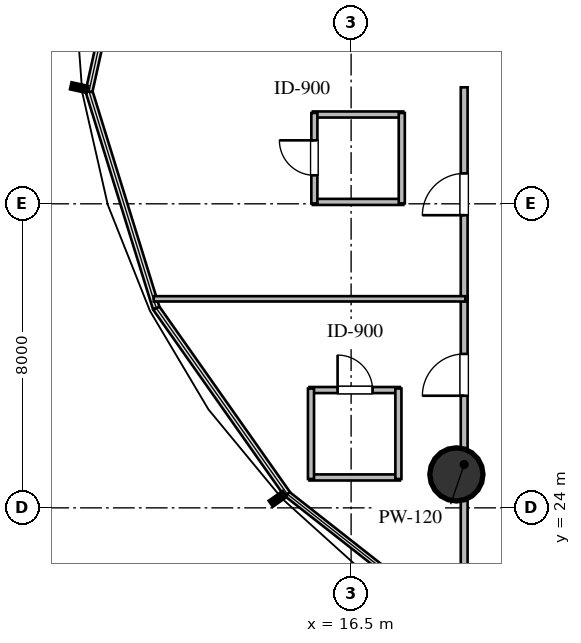
"""IFC4 building model, lengths in metres.
Left out: names, types, materials, properties, quantities, classifications, styles, units other than length and angle.
Written with IfcOpenShell. Run it as: python <this file> out.ifc"""

import sys

from ifc_helpers import new_model, si_unit, direction, frame, frame_2d, origin, origin_2d, place, context, subcontext, project, spatial, rectangle, circle, extrude, element, fill, save


model = new_model("IFC4")
c1 = context("Model", 3, precision=1e-05, world=origin(), true_north=direction((0.0, 1.0)))
c2 = subcontext(c1, "Body", "Model", "MODEL_VIEW")
j1 = project(units=[si_unit("LENGTHUNIT", "METRE"), si_unit("PLANEANGLEUNIT", "RADIAN")], contexts=[c1])
p1 = place(None, origin())
s1 = spatial("IfcSite", under=j1, at=p1, CompositionType="ELEMENT")
p2 = place(p1, origin())
s2 = spatial("IfcBuilding", under=s1, at=p2, CompositionType="ELEMENT")
p3 = place(p2, frame((0.0, 0.0, 67.2)))
s3 = spatial("IfcBuildingStorey", under=s2, at=p3, CompositionType="ELEMENT", Elevation=67.2)
p4 = place(p3, frame((19.27, 24.88, 0.0), z_axis=(0.0, 0.0, 1.0), x_axis=(1.0, 0.0, 0.0)))
e1 = element("IfcColumn", 1, at=p4, inside=s3, PredefinedType="COLUMN", context=c2, shape_type="SweptSolid", body=[
    extrude(circle(Radius=0.7, at=origin_2d()), origin(), (0.0, 0.0, 1.0), 3.6),
])
p5 = place(p3, frame((15.404, 24.8, 0.0), z_axis=(0.0, 0.0, 1.0), x_axis=(1.0, 0.0, 0.0)))
e2 = element("IfcWall", 2, at=p5, inside=s3, PredefinedType="PLUMBINGWALL", context=c2, shape_type="SweptSolid", body=[
    extrude(rectangle(XDim=2.38, YDim=0.16, at=frame_2d((1.19, 0.0))), origin(), (0.0, 0.0, 1.0), 3.36),
])
p6 = place(p3, frame((15.404, 27.1, 0.0), z_axis=(0.0, 0.0, 1.0), x_axis=(1.0, 0.0, 0.0)))
e3 = element("IfcWall", 3, at=p6, inside=s3, PredefinedType="PLUMBINGWALL", context=c2, shape_type="SweptSolid", body=[
    extrude(rectangle(XDim=2.38, YDim=0.16, at=frame_2d((1.19, 0.0))), origin(), (0.0, 0.0, 1.0), 3.36),
])
p7 = place(p6, frame((0.74, 0.0, 0.0)))
e4 = element("IfcOpeningElement", 4, at=p7, cuts=e3, PredefinedType="OPENING", context=c2, shape_type="SweptSolid", body=[
    extrude(rectangle(XDim=0.92, YDim=2.1, at=frame_2d((0.46, 1.05))), frame((0.0, 0.09, 0.0), z_axis=(0.0, -1.0, 0.0), x_axis=(1.0, 0.0, 0.0)), (0.0, 0.0, 1.0), 0.18),
])
for number, where, z_axis, x_axis in (
    (5, (15.444, 24.76, 0.0), (0.0, 0.0, 1.0), (0.0, 1.0, 0.0)),
    (6, (17.744, 24.76, 0.0), (0.0, 0.0, 1.0), (0.0, 1.0, 0.0)),
):
    element("IfcWall", number, at=place(p3, frame(where, z_axis=z_axis, x_axis=x_axis)), inside=s3, PredefinedType="PLUMBINGWALL", context=c2, shape_type="SweptSolid", body=[
        extrude(rectangle(XDim=2.38, YDim=0.16, at=frame_2d((1.19, 0.0))), origin(), (0.0, 0.0, 1.0), 3.36),
    ])
for number, where, z_axis, x_axis in (
    (7, (15.493, 32.05, 0.0), (0.0, 0.0, 1.0), (1.0, 0.0, 0.0)),
    (8, (15.493, 34.35, 0.0), (0.0, 0.0, 1.0), (1.0, 0.0, 0.0)),
):
    element("IfcWall", number, at=place(p3, frame(where, z_axis=z_axis, x_axis=x_axis)), inside=s3, PredefinedType="PLUMBINGWALL", context=c2, shape_type="SweptSolid", body=[
        extrude(rectangle(XDim=2.38, YDim=0.16, at=frame_2d((1.19, 0.0))), origin(), (0.0, 0.0, 1.0), 3.36),
    ])
p8 = place(p3, frame((15.533, 32.01, 0.0), z_axis=(0.0, 0.0, 1.0), x_axis=(0.0, 1.0, 0.0)))
e9 = element("IfcWall", 9, at=p8, inside=s3, PredefinedType="PLUMBINGWALL", context=c2, shape_type="SweptSolid", body=[
    extrude(rectangle(XDim=2.38, YDim=0.16, at=frame_2d((1.19, 0.0))), origin(), (0.0, 0.0, 1.0), 3.36),
])
p9 = place(p8, frame((0.74, 0.0, 0.0)))
e10 = element("IfcOpeningElement", 10, at=p9, cuts=e9, PredefinedType="OPENING", context=c2, shape_type="SweptSolid", body=[
    extrude(rectangle(XDim=0.92, YDim=2.1, at=frame_2d((0.46, 1.05))), frame((0.0, 0.09, 0.0), z_axis=(0.0, -1.0, 0.0), x_axis=(1.0, 0.0, 0.0)), (0.0, 0.0, 1.0), 0.18),
])
p10 = place(p3, frame((17.833, 32.01, 0.0), z_axis=(0.0, 0.0, 1.0), x_axis=(0.0, 1.0, 0.0)))
e11 = element("IfcWall", 11, at=p10, inside=s3, PredefinedType="PLUMBINGWALL", context=c2, shape_type="SweptSolid", body=[
    extrude(rectangle(XDim=2.38, YDim=0.16, at=frame_2d((1.19, 0.0))), origin(), (0.0, 0.0, 1.0), 2.738),
])
p11 = place(p3, frame((19.475, 20.715, 0.0), z_axis=(0.0, 0.0, 1.0), x_axis=(0.0, 1.0, 0.0)))
e12 = element("IfcWall", 12, at=p11, inside=s3, PredefinedType="PARTITIONING", context=c2, shape_type="SweptSolid", body=[
    extrude(rectangle(XDim=8.85, YDim=0.18, at=frame_2d((4.425, 0.0))), origin(), (0.0, 0.0, 1.0), 2.738),
])
p12 = place(p11, frame((6.235, 0.0, 0.0)))
e13 = element("IfcOpeningElement", 13, at=p12, cuts=e12, PredefinedType="OPENING", context=c2, shape_type="SweptSolid", body=[
    extrude(rectangle(XDim=1.1, YDim=2.1, at=frame_2d((0.55, 1.05))), frame((0.0, 0.1, 0.0), z_axis=(0.0, -1.0, 0.0), x_axis=(1.0, 0.0, 0.0)), (0.0, 0.0, 1.0), 0.2),
])
p13 = place(p3, frame((19.475, 29.435, 0.0), z_axis=(0.0, 0.0, 1.0), x_axis=(0.0, 1.0, 0.0)))
e14 = element("IfcWall", 14, at=p13, inside=s3, PredefinedType="PARTITIONING", context=c2, shape_type="SweptSolid", body=[
    extrude(rectangle(XDim=5.63, YDim=0.18, at=frame_2d((2.815, 0.0))), origin(), (0.0, 0.0, 1.0), 3.36),
])
p14 = place(p13, frame((2.265, 0.0, 0.0)))
e15 = element("IfcOpeningElement", 15, at=p14, cuts=e14, PredefinedType="OPENING", context=c2, shape_type="SweptSolid", body=[
    extrude(rectangle(XDim=1.1, YDim=2.1, at=frame_2d((0.55, 1.05))), frame((0.0, 0.1, 0.0), z_axis=(0.0, -1.0, 0.0), x_axis=(1.0, 0.0, 0.0)), (0.0, 0.0, 1.0), 0.2),
])
p15 = place(p3, frame((11.306, 29.5, 0.0), z_axis=(0.0, 0.0, 1.0), x_axis=(1.0, 0.0, 0.0)))
e16 = element("IfcWall", 16, at=p15, inside=s3, PredefinedType="PARTITIONING", context=c2, shape_type="SweptSolid", body=[
    extrude(rectangle(XDim=8.199, YDim=0.14, at=frame_2d((4.1, 0.0))), origin(), (0.0, 0.0, 1.0), 3.36),
])
p16 = place(p7, origin())
e17 = element("IfcDoor", 17, at=p16, inside=s3, OperationType="SINGLE_SWING_LEFT", PredefinedType="DOOR", context=c2, shape_type="SweptSolid", body=[
    extrude(rectangle(XDim=0.92, YDim=2.1, at=frame_2d((0.46, 1.05))), frame((0.0, 0.025, 0.0), z_axis=(0.0, -1.0, 0.0), x_axis=(1.0, 0.0, 0.0)), (0.0, 0.0, 1.0), 0.05),
])
fill(e4, e17)
p17 = place(p9, origin())
e18 = element("IfcDoor", 18, at=p17, inside=s3, OperationType="SINGLE_SWING_RIGHT", PredefinedType="DOOR", context=c2, shape_type="SweptSolid", body=[
    extrude(rectangle(XDim=0.92, YDim=2.1, at=frame_2d((0.46, 1.05))), frame((0.0, 0.025, 0.0), z_axis=(0.0, -1.0, 0.0), x_axis=(1.0, 0.0, 0.0)), (0.0, 0.0, 1.0), 0.05),
])
fill(e10, e18)
p18 = place(p12, origin())
e19 = element("IfcDoor", 19, at=p18, inside=s3, OperationType="SINGLE_SWING_LEFT", PredefinedType="DOOR", context=c2, shape_type="SweptSolid", body=[
    extrude(rectangle(XDim=1.1, YDim=2.1, at=frame_2d((0.55, 1.05))), frame((0.0, 0.025, 0.0), z_axis=(0.0, -1.0, 0.0), x_axis=(1.0, 0.0, 0.0)), (0.0, 0.0, 1.0), 0.05),
])
fill(e13, e19)
p19 = place(p14, origin())
e20 = element("IfcDoor", 20, at=p19, inside=s3, OperationType="SINGLE_SWING_LEFT", PredefinedType="DOOR", context=c2, shape_type="SweptSolid", body=[
    extrude(rectangle(XDim=1.1, YDim=2.1, at=frame_2d((0.55, 1.05))), frame((0.0, 0.025, 0.0), z_axis=(0.0, -1.0, 0.0), x_axis=(1.0, 0.0, 0.0)), (0.0, 0.0, 1.0), 0.05),
])
fill(e15, e20)
save(model, sys.argv[1])
